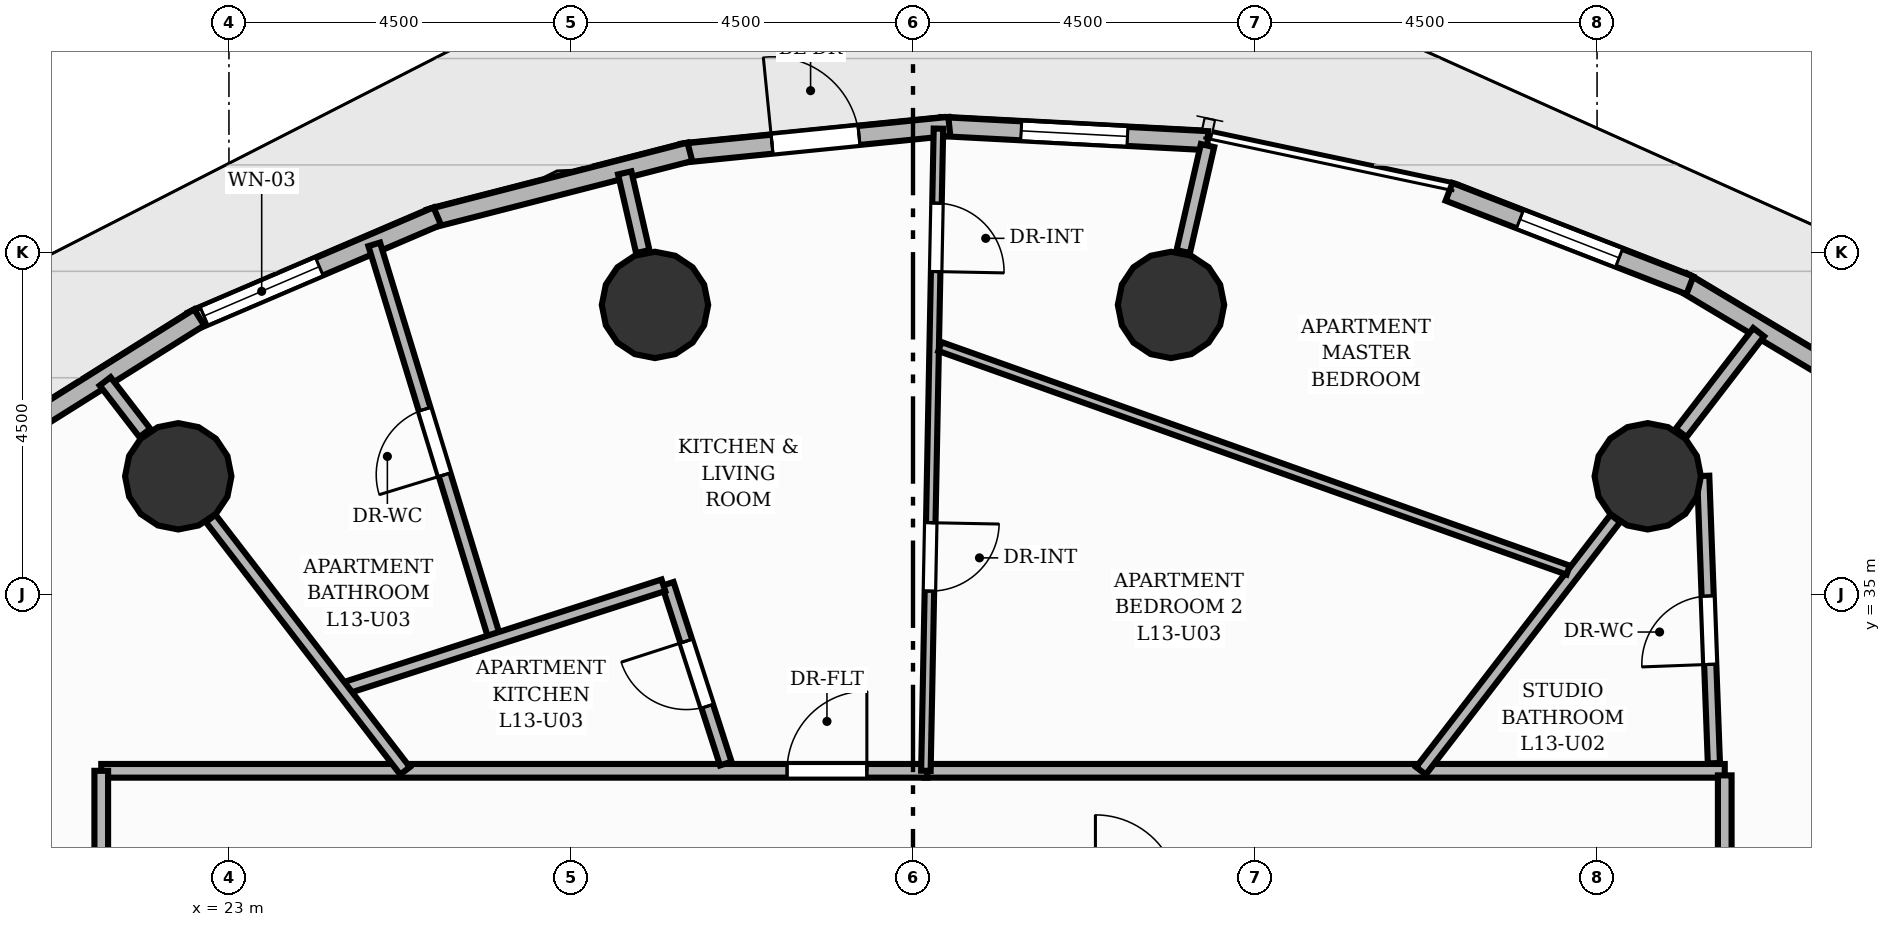
"""IFC4 building model, lengths in metres.
Left out: names, types, materials, properties, quantities, classifications, styles, units other than length and angle.
Written with IfcOpenShell. Run it as: python <this file> out.ifc"""

import sys

from ifc_helpers import new_model, si_unit, direction, frame, frame_2d, origin, origin_2d, place, context, subcontext, project, spatial, rectangle, circle, extrude, element, fill, save


model = new_model("IFC4")
c1 = context("Model", 3, precision=1e-05, world=origin(), true_north=direction((0.0, 1.0)))
c2 = subcontext(c1, "Body", "Model", "MODEL_VIEW")
j1 = project(units=[si_unit("LENGTHUNIT", "METRE"), si_unit("PLANEANGLEUNIT", "RADIAN")], contexts=[c1])
p1 = place(None, origin())
s1 = spatial("IfcSite", under=j1, at=p1, CompositionType="ELEMENT")
p2 = place(p1, origin())
s2 = spatial("IfcBuilding", under=s1, at=p2, CompositionType="ELEMENT")
p3 = place(p2, frame((0.0, 0.0, 47.2)))
s3 = spatial("IfcBuildingStorey", under=s2, at=p3, CompositionType="ELEMENT", Elevation=47.2)
for number, where, z_axis, x_axis in (
    (1, (41.667, 36.555, 0.0), (0.0, 0.0, 1.0), (1.0, 0.0, 0.0)),
    (2, (35.395, 38.81, 0.0), (0.0, 0.0, 1.0), (1.0, 0.0, 0.0)),
    (3, (28.605, 38.81, 0.0), (0.0, 0.0, 1.0), (1.0, 0.0, 0.0)),
    (4, (22.333, 36.555, 0.0), (0.0, 0.0, 1.0), (1.0, 0.0, 0.0)),
):
    element("IfcColumn", number, at=place(p3, frame(where, z_axis=z_axis, x_axis=x_axis)), inside=s3, PredefinedType="COLUMN", context=c2, shape_type="SweptSolid", body=[
        extrude(circle(Radius=0.7, at=origin_2d()), origin(), (0.0, 0.0, 1.0), 3.2),
    ])
p4 = place(p3, frame((42.122, 39.116, 0.0), z_axis=(0.0, 0.0, 1.0), x_axis=(0.858069400356, -0.513533742001, 0.0)))
e5 = element("IfcWall", 5, at=p4, inside=s3, PredefinedType="SOLIDWALL", context=c2, shape_type="SweptSolid", body=[
    extrude(rectangle(XDim=3.323, YDim=0.25, at=frame_2d((1.661, 0.0))), origin(), (0.0, 0.0, 1.0), 2.96),
])
p5 = place(p3, frame((39.053, 40.298, 0.0), z_axis=(0.0, 0.0, 1.0), x_axis=(0.932140755825, -0.362096135479, 0.0)))
e6 = element("IfcWall", 6, at=p5, inside=s3, PredefinedType="SOLIDWALL", context=c2, shape_type="SweptSolid", body=[
    extrude(rectangle(XDim=3.399, YDim=0.25, at=frame_2d((1.699, 0.0))), origin(), (0.0, 0.0, 1.0), 2.96),
])
p6 = place(p5, frame((1.0, 0.0, 0.85)))
e7 = element("IfcOpeningElement", 7, at=p6, cuts=e6, PredefinedType="OPENING", context=c2, shape_type="SweptSolid", body=[
    extrude(rectangle(XDim=1.4, YDim=1.55, at=frame_2d((0.7, 0.775))), frame((0.0, 0.135, 0.0), z_axis=(0.0, -1.0, 0.0), x_axis=(1.0, 0.0, 0.0)), (0.0, 0.0, 1.0), 0.27),
])
p7 = place(p3, frame((32.369, 41.156, 0.0), z_axis=(0.0, 0.0, 1.0), x_axis=(0.99860782827, -0.052748510102, 0.0)))
e8 = element("IfcWall", 8, at=p7, inside=s3, PredefinedType="SOLIDWALL", context=c2, shape_type="SweptSolid", body=[
    extrude(rectangle(XDim=3.513, YDim=0.25, at=frame_2d((1.756, 0.0))), origin(), (0.0, 0.0, 1.0), 2.96),
])
p8 = place(p7, frame((1.056, 0.0, 0.85)))
e9 = element("IfcOpeningElement", 9, at=p8, cuts=e8, PredefinedType="OPENING", context=c2, shape_type="SweptSolid", body=[
    extrude(rectangle(XDim=1.4, YDim=1.55, at=frame_2d((0.7, 0.775))), frame((0.0, 0.135, 0.0), z_axis=(0.0, -1.0, 0.0), x_axis=(1.0, 0.0, 0.0)), (0.0, 0.0, 1.0), 0.27),
])
p9 = place(p3, frame((28.957, 40.806, 0.0), z_axis=(0.0, 0.0, 1.0), x_axis=(0.994996115016, 0.099913618207, 0.0)))
e10 = element("IfcWall", 10, at=p9, inside=s3, PredefinedType="SOLIDWALL", context=c2, shape_type="SweptSolid", body=[
    extrude(rectangle(XDim=3.538, YDim=0.25, at=frame_2d((1.769, 0.0))), origin(), (0.0, 0.0, 1.0), 2.96),
])
p10 = place(p9, frame((1.194, 0.0, 0.0)))
e11 = element("IfcOpeningElement", 11, at=p10, cuts=e10, PredefinedType="OPENING", context=c2, shape_type="SweptSolid", body=[
    extrude(rectangle(XDim=1.15, YDim=2.2, at=frame_2d((0.575, 1.1))), frame((0.0, 0.135, 0.0), z_axis=(0.0, -1.0, 0.0), x_axis=(1.0, 0.0, 0.0)), (0.0, 0.0, 1.0), 0.27),
])
p11 = place(p3, frame((25.638, 39.943, 0.0), z_axis=(0.0, 0.0, 1.0), x_axis=(0.968459637573, 0.249170484594, 0.0)))
e12 = element("IfcWall", 12, at=p11, inside=s3, PredefinedType="SOLIDWALL", context=c2, shape_type="SweptSolid", body=[
    extrude(rectangle(XDim=3.538, YDim=0.25, at=frame_2d((1.769, 0.0))), origin(), (0.0, 0.0, 1.0), 2.96),
])
p12 = place(p3, frame((22.511, 38.595, 0.0), z_axis=(0.0, 0.0, 1.0), x_axis=(0.919263615987, 0.393642482872, 0.0)))
e13 = element("IfcWall", 13, at=p12, inside=s3, PredefinedType="SOLIDWALL", context=c2, shape_type="SweptSolid", body=[
    extrude(rectangle(XDim=3.513, YDim=0.25, at=frame_2d((1.756, 0.0))), origin(), (0.0, 0.0, 1.0), 2.96),
])
p13 = place(p12, frame((0.175, 0.0, 0.85)))
e14 = element("IfcOpeningElement", 14, at=p13, cuts=e13, PredefinedType="OPENING", context=c2, shape_type="SweptSolid", body=[
    extrude(rectangle(XDim=1.65, YDim=1.55, at=frame_2d((0.825, 0.775))), frame((0.0, 0.135, 0.0), z_axis=(0.0, -1.0, 0.0), x_axis=(1.0, 0.0, 0.0)), (0.0, 0.0, 1.0), 0.27),
])
p14 = place(p3, frame((19.674, 36.803, 0.0), z_axis=(0.0, 0.0, 1.0), x_axis=(0.846852351865, 0.531828068215, 0.0)))
e15 = element("IfcWall", 15, at=p14, inside=s3, PredefinedType="SOLIDWALL", context=c2, shape_type="SweptSolid", body=[
    extrude(rectangle(XDim=3.465, YDim=0.25, at=frame_2d((1.732, 0.0))), origin(), (0.0, 0.0, 1.0), 2.96),
])
p15 = place(p3, frame((42.106, 37.126, 0.0), z_axis=(0.0, 0.0, 1.0), x_axis=(0.610021184497, 0.792385104898, 0.0)))
e16 = element("IfcWall", 16, at=p15, inside=s3, PredefinedType="PARTITIONING", context=c2, shape_type="SweptSolid", body=[
    extrude(rectangle(XDim=1.672, YDim=0.18, at=frame_2d((0.836, 0.0))), origin(), (0.0, 0.0, 1.0), 2.178),
])
p16 = place(p3, frame((35.555, 39.512, 0.0), z_axis=(0.0, 0.0, 1.0), x_axis=(0.223463944202, 0.974712196313, 0.0)))
e17 = element("IfcWall", 17, at=p16, inside=s3, PredefinedType="PARTITIONING", context=c2, shape_type="SweptSolid", body=[
    extrude(rectangle(XDim=1.431, YDim=0.18, at=frame_2d((0.716, 0.0))), origin(), (0.0, 0.0, 1.0), 2.178),
])
p17 = place(p3, frame((28.445, 39.512, 0.0), z_axis=(0.0, 0.0, 1.0), x_axis=(-0.223348866575, 0.974738572028, 0.0)))
e18 = element("IfcWall", 18, at=p17, inside=s3, PredefinedType="PARTITIONING", context=c2, shape_type="SweptSolid", body=[
    extrude(rectangle(XDim=1.062, YDim=0.18, at=frame_2d((0.531, 0.0))), origin(), (0.0, 0.0, 1.0), 2.178),
])
p18 = place(p3, frame((21.894, 37.126, 0.0), z_axis=(0.0, 0.0, 1.0), x_axis=(-0.610124026743, 0.792305920709, 0.0)))
e19 = element("IfcWall", 19, at=p18, inside=s3, PredefinedType="PARTITIONING", context=c2, shape_type="SweptSolid", body=[
    extrude(rectangle(XDim=0.856, YDim=0.18, at=frame_2d((0.428, 0.0))), origin(), (0.0, 0.0, 1.0), 2.178),
])
p19 = place(p3, frame((32.15, 32.68, 0.0), z_axis=(0.0, 0.0, 1.0), x_axis=(1.0, 0.0, 0.0)))
e20 = element("IfcWall", 20, at=p19, inside=s3, PredefinedType="PARTITIONING", context=c2, shape_type="SweptSolid", body=[
    extrude(rectangle(XDim=10.53, YDim=0.18, at=frame_2d((5.265, 0.0))), origin(), (0.0, 0.0, 1.0), 2.955),
])
p20 = place(p3, frame((42.68, 32.62, 0.0), z_axis=(0.0, 0.0, 1.0), x_axis=(0.0, -1.0, 0.0)))
e21 = element("IfcWall", 21, at=p20, inside=s3, PredefinedType="PARTITIONING", context=c2, shape_type="SweptSolid", body=[
    extrude(rectangle(XDim=17.24, YDim=0.18, at=frame_2d((8.62, 0.0))), origin(), (0.0, 0.0, 1.0), 2.955),
])
p21 = place(p20, frame((8.095, 0.0, 0.0)))
e22 = element("IfcOpeningElement", 22, at=p21, cuts=e21, PredefinedType="OPENING", context=c2, shape_type="SweptSolid", body=[
    extrude(rectangle(XDim=1.05, YDim=2.15, at=frame_2d((0.525, 1.075))), frame((0.0, 0.1, 0.0), z_axis=(0.0, -1.0, 0.0), x_axis=(1.0, 0.0, 0.0)), (0.0, 0.0, 1.0), 0.2),
])
p22 = place(p3, frame((21.32, 32.68, 0.0), z_axis=(0.0, 0.0, 1.0), x_axis=(1.0, 0.0, 0.0)))
e23 = element("IfcWall", 23, at=p22, inside=s3, PredefinedType="PARTITIONING", context=c2, shape_type="SweptSolid", body=[
    extrude(rectangle(XDim=10.87, YDim=0.18, at=frame_2d((5.435, 0.0))), origin(), (0.0, 0.0, 1.0), 2.955),
])
p23 = place(p22, frame((9.023, 0.0, 0.0)))
e24 = element("IfcOpeningElement", 24, at=p23, cuts=e23, PredefinedType="OPENING", context=c2, shape_type="SweptSolid", body=[
    extrude(rectangle(XDim=1.05, YDim=2.15, at=frame_2d((0.525, 1.075))), frame((0.0, 0.1, 0.0), z_axis=(0.0, -1.0, 0.0), x_axis=(1.0, 0.0, 0.0)), (0.0, 0.0, 1.0), 0.2),
])
p24 = place(p3, frame((21.32, 15.38, 0.0), z_axis=(0.0, 0.0, 1.0), x_axis=(0.0, 1.0, 0.0)))
e25 = element("IfcWall", 25, at=p24, inside=s3, PredefinedType="PARTITIONING", context=c2, shape_type="SweptSolid", body=[
    extrude(rectangle(XDim=17.3, YDim=0.18, at=frame_2d((8.65, 0.0))), origin(), (0.0, 0.0, 1.0), 2.955),
])
p25 = place(p24, frame((8.125, 0.0, 0.0)))
e26 = element("IfcOpeningElement", 26, at=p25, cuts=e25, PredefinedType="OPENING", context=c2, shape_type="SweptSolid", body=[
    extrude(rectangle(XDim=1.05, YDim=2.15, at=frame_2d((0.525, 1.075))), frame((0.0, 0.1, 0.0), z_axis=(0.0, -1.0, 0.0), x_axis=(1.0, 0.0, 0.0)), (0.0, 0.0, 1.0), 0.2),
])
p26 = place(p3, frame((42.537, 32.78, 0.0), z_axis=(0.0, 0.0, 1.0), x_axis=(-0.037109528702, 0.99931120422, 0.0)))
e27 = element("IfcWall", 27, at=p26, inside=s3, PredefinedType="PLUMBINGWALL", context=c2, shape_type="SweptSolid", body=[
    extrude(rectangle(XDim=3.783, YDim=0.16, at=frame_2d((1.892, 0.0))), origin(), (0.0, 0.0, 1.0), 2.955),
])
p27 = place(p26, frame((1.302, 0.0, 0.0)))
e28 = element("IfcOpeningElement", 28, at=p27, cuts=e27, PredefinedType="OPENING", context=c2, shape_type="SweptSolid", body=[
    extrude(rectangle(XDim=0.9, YDim=2.1, at=frame_2d((0.45, 1.05))), frame((0.0, 0.09, 0.0), z_axis=(0.0, -1.0, 0.0), x_axis=(1.0, 0.0, 0.0)), (0.0, 0.0, 1.0), 0.18),
])
p28 = place(p3, frame((38.683, 32.68, 0.0), z_axis=(0.0, 0.0, 1.0), x_axis=(0.610034370134, 0.792374953703, 0.0)))
e29 = element("IfcWall", 29, at=p28, inside=s3, PredefinedType="PLUMBINGWALL", context=c2, shape_type="SweptSolid", body=[
    extrude(rectangle(XDim=4.192, YDim=0.16, at=frame_2d((2.096, 0.0))), origin(), (0.0, 0.0, 1.0), 2.178),
])
p29 = place(p3, frame((26.5, 34.406, 0.0), z_axis=(0.0, 0.0, 1.0), x_axis=(-0.292167210162, 0.956367252318, 0.0)))
e30 = element("IfcWall", 30, at=p29, inside=s3, PredefinedType="PLUMBINGWALL", context=c2, shape_type="SweptSolid", body=[
    extrude(rectangle(XDim=5.438, YDim=0.16, at=frame_2d((2.719, 0.0))), origin(), (0.0, 0.0, 1.0), 2.955),
])
p30 = place(p29, frame((2.269, 0.0, 0.0)))
e31 = element("IfcOpeningElement", 31, at=p30, cuts=e30, PredefinedType="OPENING", context=c2, shape_type="SweptSolid", body=[
    extrude(rectangle(XDim=0.9, YDim=2.1, at=frame_2d((0.45, 1.05))), frame((0.0, 0.09, 0.0), z_axis=(0.0, -1.0, 0.0), x_axis=(1.0, 0.0, 0.0)), (0.0, 0.0, 1.0), 0.18),
])
p31 = place(p3, frame((32.335, 41.13, 0.0), z_axis=(0.0, 0.0, 1.0), x_axis=(-0.019528202577, -0.99980930647, 0.0)))
e32 = element("IfcWall", 32, at=p31, inside=s3, PredefinedType="PARTITIONING", context=c2, shape_type="SweptSolid", body=[
    extrude(rectangle(XDim=8.451, YDim=0.125, at=frame_2d((4.226, 0.0))), origin(), (0.0, 0.0, 1.0), 2.955),
])
p32 = place(p31, frame((0.981, 0.0, 0.0)))
e33 = element("IfcOpeningElement", 33, at=p32, cuts=e32, PredefinedType="OPENING", context=c2, shape_type="SweptSolid", body=[
    extrude(rectangle(XDim=0.9, YDim=2.1, at=frame_2d((0.45, 1.05))), frame((0.0, 0.073, 0.0), z_axis=(0.0, -1.0, 0.0), x_axis=(1.0, 0.0, 0.0)), (0.0, 0.0, 1.0), 0.145),
])
p33 = place(p31, frame((5.186, 0.0, 0.0)))
e34 = element("IfcOpeningElement", 34, at=p33, cuts=e32, PredefinedType="OPENING", context=c2, shape_type="SweptSolid", body=[
    extrude(rectangle(XDim=0.9, YDim=2.1, at=frame_2d((0.45, 1.05))), frame((0.0, 0.073, 0.0), z_axis=(0.0, -1.0, 0.0), x_axis=(1.0, 0.0, 0.0)), (0.0, 0.0, 1.0), 0.145),
])
p34 = place(p3, frame((29.537, 32.775, 0.0), z_axis=(0.0, 0.0, 1.0), x_axis=(-0.307163549255, 0.951656741693, 0.0)))
e35 = element("IfcWall", 35, at=p34, inside=s3, PredefinedType="PLUMBINGWALL", context=c2, shape_type="SweptSolid", body=[
    extrude(rectangle(XDim=2.485, YDim=0.16, at=frame_2d((1.242, 0.0))), origin(), (0.0, 0.0, 1.0), 2.955),
])
p35 = place(p34, frame((0.792, 0.0, 0.0)))
e36 = element("IfcOpeningElement", 36, at=p35, cuts=e35, PredefinedType="OPENING", context=c2, shape_type="SweptSolid", body=[
    extrude(rectangle(XDim=0.9, YDim=2.1, at=frame_2d((0.45, 1.05))), frame((0.0, 0.09, 0.0), z_axis=(0.0, -1.0, 0.0), x_axis=(1.0, 0.0, 0.0)), (0.0, 0.0, 1.0), 0.18),
])
p36 = place(p3, frame((28.716, 35.121, 0.0), z_axis=(0.0, 0.0, 1.0), x_axis=(-0.951640751353, -0.307213086253, 0.0)))
e37 = element("IfcWall", 37, at=p36, inside=s3, PredefinedType="PLUMBINGWALL", context=c2, shape_type="SweptSolid", body=[
    extrude(rectangle(XDim=4.443, YDim=0.16, at=frame_2d((2.222, 0.0))), origin(), (0.0, 0.0, 1.0), 2.955),
])
p37 = place(p3, frame((25.317, 32.68, 0.0), z_axis=(0.0, 0.0, 1.0), x_axis=(-0.610070932863, 0.792346803411, 0.0)))
e38 = element("IfcWall", 38, at=p37, inside=s3, PredefinedType="PLUMBINGWALL", context=c2, shape_type="SweptSolid", body=[
    extrude(rectangle(XDim=4.192, YDim=0.16, at=frame_2d((2.096, 0.0))), origin(), (0.0, 0.0, 1.0), 2.178),
])
p38 = place(p3, frame((40.62, 35.32, 0.0), z_axis=(0.0, 0.0, 1.0), x_axis=(-0.9420945855, 0.335347270709, 0.0)))
e39 = element("IfcWall", 39, at=p38, inside=s3, PredefinedType="PARTITIONING", context=c2, shape_type="SweptSolid", body=[
    extrude(rectangle(XDim=8.773, YDim=0.125, at=frame_2d((4.387, 0.0))), origin(), (0.0, 0.0, 1.0), 2.955),
])
p39 = place(p10, origin())
e40 = element("IfcDoor", 40, at=p39, inside=s3, OperationType="SINGLE_SWING_LEFT", PredefinedType="DOOR", context=c2, shape_type="SweptSolid", body=[
    extrude(rectangle(XDim=1.15, YDim=2.2, at=frame_2d((0.575, 1.1))), frame((0.0, 0.025, 0.0), z_axis=(0.0, -1.0, 0.0), x_axis=(1.0, 0.0, 0.0)), (0.0, 0.0, 1.0), 0.05),
])
fill(e11, e40)
p40 = place(p6, origin())
e41 = element("IfcWindow", 41, at=p40, inside=s3, PartitioningType="SINGLE_PANEL", PredefinedType="WINDOW", context=c2, shape_type="SweptSolid", body=[
    extrude(rectangle(XDim=1.4, YDim=1.55, at=frame_2d((0.7, 0.775))), frame((0.0, 0.03, 0.0), z_axis=(0.0, -1.0, 0.0), x_axis=(1.0, 0.0, 0.0)), (0.0, 0.0, 1.0), 0.06),
])
fill(e7, e41)
p41 = place(p8, origin())
e42 = element("IfcWindow", 42, at=p41, inside=s3, PartitioningType="SINGLE_PANEL", PredefinedType="WINDOW", context=c2, shape_type="SweptSolid", body=[
    extrude(rectangle(XDim=1.4, YDim=1.55, at=frame_2d((0.7, 0.775))), frame((0.0, 0.03, 0.0), z_axis=(0.0, -1.0, 0.0), x_axis=(1.0, 0.0, 0.0)), (0.0, 0.0, 1.0), 0.06),
])
fill(e9, e42)
p42 = place(p13, origin())
e43 = element("IfcWindow", 43, at=p42, inside=s3, PartitioningType="SINGLE_PANEL", PredefinedType="WINDOW", context=c2, shape_type="SweptSolid", body=[
    extrude(rectangle(XDim=1.65, YDim=1.55, at=frame_2d((0.825, 0.775))), frame((0.0, 0.03, 0.0), z_axis=(0.0, -1.0, 0.0), x_axis=(1.0, 0.0, 0.0)), (0.0, 0.0, 1.0), 0.06),
])
fill(e14, e43)
p43 = place(p27, origin())
e44 = element("IfcDoor", 44, at=p43, inside=s3, OperationType="SINGLE_SWING_LEFT", PredefinedType="DOOR", context=c2, shape_type="SweptSolid", body=[
    extrude(rectangle(XDim=0.9, YDim=2.1, at=frame_2d((0.45, 1.05))), frame((0.0, 0.025, 0.0), z_axis=(0.0, -1.0, 0.0), x_axis=(1.0, 0.0, 0.0)), (0.0, 0.0, 1.0), 0.05),
])
fill(e28, e44)
p44 = place(p23, origin())
e45 = element("IfcDoor", 45, at=p44, inside=s3, OperationType="SINGLE_SWING_RIGHT", PredefinedType="DOOR", context=c2, shape_type="SweptSolid", body=[
    extrude(rectangle(XDim=1.05, YDim=2.15, at=frame_2d((0.525, 1.075))), frame((0.0, 0.025, 0.0), z_axis=(0.0, -1.0, 0.0), x_axis=(1.0, 0.0, 0.0)), (0.0, 0.0, 1.0), 0.05),
])
fill(e24, e45)
p45 = place(p30, origin())
e46 = element("IfcDoor", 46, at=p45, inside=s3, OperationType="SINGLE_SWING_LEFT", PredefinedType="DOOR", context=c2, shape_type="SweptSolid", body=[
    extrude(rectangle(XDim=0.9, YDim=2.1, at=frame_2d((0.45, 1.05))), frame((0.0, 0.025, 0.0), z_axis=(0.0, -1.0, 0.0), x_axis=(1.0, 0.0, 0.0)), (0.0, 0.0, 1.0), 0.05),
])
fill(e31, e46)
p46 = place(p32, origin())
e47 = element("IfcDoor", 47, at=p46, inside=s3, OperationType="SINGLE_SWING_RIGHT", PredefinedType="DOOR", context=c2, shape_type="SweptSolid", body=[
    extrude(rectangle(XDim=0.9, YDim=2.1, at=frame_2d((0.45, 1.05))), frame((0.0, 0.025, 0.0), z_axis=(0.0, -1.0, 0.0), x_axis=(1.0, 0.0, 0.0)), (0.0, 0.0, 1.0), 0.05),
])
fill(e33, e47)
p47 = place(p33, origin())
e48 = element("IfcDoor", 48, at=p47, inside=s3, OperationType="SINGLE_SWING_LEFT", PredefinedType="DOOR", context=c2, shape_type="SweptSolid", body=[
    extrude(rectangle(XDim=0.9, YDim=2.1, at=frame_2d((0.45, 1.05))), frame((0.0, 0.025, 0.0), z_axis=(0.0, -1.0, 0.0), x_axis=(1.0, 0.0, 0.0)), (0.0, 0.0, 1.0), 0.05),
])
fill(e34, e48)
p48 = place(p35, origin())
e49 = element("IfcDoor", 49, at=p48, inside=s3, OperationType="SINGLE_SWING_RIGHT", PredefinedType="DOOR", context=c2, shape_type="SweptSolid", body=[
    extrude(rectangle(XDim=0.9, YDim=2.1, at=frame_2d((0.45, 1.05))), frame((0.0, 0.025, 0.0), z_axis=(0.0, -1.0, 0.0), x_axis=(1.0, 0.0, 0.0)), (0.0, 0.0, 1.0), 0.05),
])
fill(e36, e49)
save(model, sys.argv[1])
